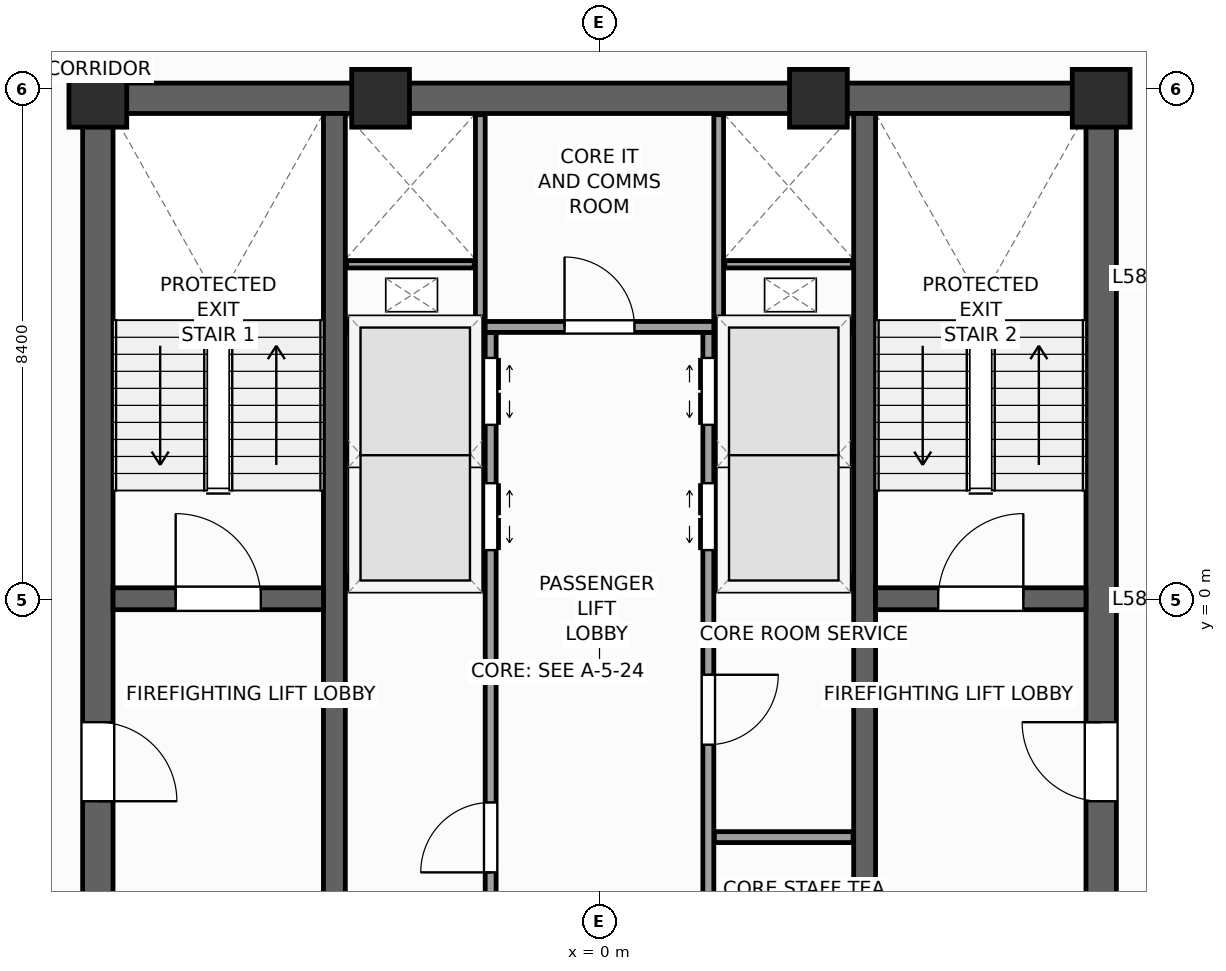
"""IFC4 building model, lengths in metres.
Left out: names, types, materials, properties, quantities, classifications, styles, units other than length and angle.
Written with IfcOpenShell. Run it as: python <this file> out.ifc"""

import sys

from ifc_helpers import new_model, si_unit, direction, frame, frame_2d, origin, origin_2d, place, context, subcontext, project, spatial, rectangle, extrude, source, transform, mapped, element, fill, save


model = new_model("IFC4")
c1 = context("Model", 3, precision=1e-05, world=origin(), true_north=direction((0.0, 1.0)))
c2 = subcontext(c1, "Body", "Model", "MODEL_VIEW")
j1 = project(units=[si_unit("LENGTHUNIT", "METRE"), si_unit("PLANEANGLEUNIT", "RADIAN")], contexts=[c1])
p1 = place(None, origin())
s1 = spatial("IfcSite", under=j1, at=p1, CompositionType="ELEMENT")
p2 = place(p1, origin())
s2 = spatial("IfcBuilding", under=s1, at=p2, CompositionType="ELEMENT")
p3 = place(p2, frame((0.0, 0.0, 240.7)))
s3 = spatial("IfcBuildingStorey", under=s2, at=p3, CompositionType="ELEMENT", Elevation=240.7)
p4 = place(p3, frame((-8.5, 8.25, 0.0), z_axis=(0.0, 0.0, 1.0), x_axis=(1.0, 0.0, 0.0)))
e1 = element("IfcWall", 1, at=p4, inside=s3, PredefinedType="SHEAR", context=c2, shape_type="SweptSolid", body=[
    extrude(rectangle(XDim=17.0, YDim=0.5, at=frame_2d((8.5, 0.0))), origin(), (0.0, 0.0, 1.0), 3.9),
])
p5 = place(p3, frame((-8.25, -8.0, 0.0), z_axis=(0.0, 0.0, 1.0), x_axis=(0.0, 1.0, 0.0)))
e2 = element("IfcWall", 2, at=p5, inside=s3, PredefinedType="SHEAR", context=c2, shape_type="SweptSolid", body=[
    extrude(rectangle(XDim=16.0, YDim=0.5, at=frame_2d((8.0, 0.0))), origin(), (0.0, 0.0, 1.0), 3.9),
])
p6 = place(p5, frame((4.69, 0.0, 0.0)))
e3 = element("IfcOpeningElement", 3, at=p6, cuts=e2, PredefinedType="OPENING", context=c2, shape_type="SweptSolid", body=[
    extrude(rectangle(XDim=1.3, YDim=2.2, at=frame_2d((0.65, 1.1))), frame((0.0, 0.26, 0.0), z_axis=(0.0, -1.0, 0.0), x_axis=(1.0, 0.0, 0.0)), (0.0, 0.0, 1.0), 0.52),
])
p7 = place(p3, frame((8.25, -8.0, 0.0), z_axis=(0.0, 0.0, 1.0), x_axis=(0.0, 1.0, 0.0)))
e4 = element("IfcWall", 4, at=p7, inside=s3, PredefinedType="SHEAR", context=c2, shape_type="SweptSolid", body=[
    extrude(rectangle(XDim=16.0, YDim=0.5, at=frame_2d((8.0, 0.0))), origin(), (0.0, 0.0, 1.0), 3.9),
])
p8 = place(p7, frame((4.69, 0.0, 0.0)))
e5 = element("IfcOpeningElement", 5, at=p8, cuts=e4, PredefinedType="OPENING", context=c2, shape_type="SweptSolid", body=[
    extrude(rectangle(XDim=1.3, YDim=2.2, at=frame_2d((0.65, 1.1))), frame((0.0, 0.26, 0.0), z_axis=(0.0, -1.0, 0.0), x_axis=(1.0, 0.0, 0.0)), (0.0, 0.0, 1.0), 0.52),
])
for number, where, z_axis, x_axis in (
    (6, (-4.36, -8.0, 0.0), (0.0, 0.0, 1.0), (0.0, 1.0, 0.0)),
    (7, (4.36, -8.0, 0.0), (0.0, 0.0, 1.0), (0.0, 1.0, 0.0)),
):
    element("IfcWall", number, at=place(p3, frame(where, z_axis=z_axis, x_axis=x_axis)), inside=s3, PredefinedType="SHEAR", context=c2, shape_type="SweptSolid", body=[
        extrude(rectangle(XDim=16.0, YDim=0.36, at=frame_2d((8.0, 0.0))), origin(), (0.0, 0.0, 1.0), 3.9),
    ])
p9 = place(p3, frame((-8.0, 0.02, 0.0), z_axis=(0.0, 0.0, 1.0), x_axis=(1.0, 0.0, 0.0)))
e8 = element("IfcWall", 8, at=p9, inside=s3, PredefinedType="SHEAR", context=c2, shape_type="SweptSolid", body=[
    extrude(rectangle(XDim=3.46, YDim=0.36, at=frame_2d((1.73, 0.0))), origin(), (0.0, 0.0, 1.0), 3.9),
])
p10 = place(p9, frame((1.03, 0.0, 0.0)))
e9 = element("IfcOpeningElement", 9, at=p10, cuts=e8, PredefinedType="OPENING", context=c2, shape_type="SweptSolid", body=[
    extrude(rectangle(XDim=1.4, YDim=2.2, at=frame_2d((0.7, 1.1))), frame((0.0, 0.19, 0.0), z_axis=(0.0, -1.0, 0.0), x_axis=(1.0, 0.0, 0.0)), (0.0, 0.0, 1.0), 0.38),
])
p11 = place(p3, frame((4.54, 0.02, 0.0), z_axis=(0.0, 0.0, 1.0), x_axis=(1.0, 0.0, 0.0)))
e10 = element("IfcWall", 10, at=p11, inside=s3, PredefinedType="SHEAR", context=c2, shape_type="SweptSolid", body=[
    extrude(rectangle(XDim=3.46, YDim=0.36, at=frame_2d((1.73, 0.0))), origin(), (0.0, 0.0, 1.0), 3.9),
])
p12 = place(p11, frame((1.03, 0.0, 0.0)))
e11 = element("IfcOpeningElement", 11, at=p12, cuts=e10, PredefinedType="OPENING", context=c2, shape_type="SweptSolid", body=[
    extrude(rectangle(XDim=1.4, YDim=2.2, at=frame_2d((0.7, 1.1))), frame((0.0, 0.19, 0.0), z_axis=(0.0, -1.0, 0.0), x_axis=(1.0, 0.0, 0.0)), (0.0, 0.0, 1.0), 0.38),
])
m1 = source(origin(), c2, "Body", "SweptSolid", [
    extrude(rectangle(XDim=0.95, YDim=0.95, at=origin_2d()), origin(), (0.0, 0.0, 1.0), 3.9),
])
for number, where, z_axis, x_axis in (
    (12, (8.25, 8.25, 0.0), (0.0, 0.0, 1.0), (1.0, 0.0, 0.0)),
    (13, (-8.25, 8.25, 0.0), (0.0, 0.0, 1.0), (1.0, 0.0, 0.0)),
    (14, (-3.6, 8.25, 0.0), (0.0, 0.0, 1.0), (1.0, 0.0, 0.0)),
    (15, (3.6, 8.25, 0.0), (0.0, 0.0, 1.0), (1.0, 0.0, 0.0)),
):
    element("IfcColumn", number, at=place(p3, frame(where, z_axis=z_axis, x_axis=x_axis)), inside=s3, PredefinedType="PILASTER", context=c2, shape_type="MappedRepresentation", body=[
        mapped(m1, transform((0.0, 0.0, 0.0), scale=1.0)),
    ])
p13 = place(p3, frame((6.733, -29.154, 0.0), z_axis=(0.0, 0.0, 1.0), x_axis=(0.629325378072, 0.77714192302, 0.0)))
e16 = element("IfcWall", 16, at=p13, inside=s3, PredefinedType="STANDARD", context=c2, shape_type="SweptSolid", body=[
    extrude(rectangle(XDim=36.84, YDim=0.34, at=frame_2d((18.42, 0.0))), origin(), (0.0, 0.0, 1.0), 2.96),
])
p14 = place(p13, frame((3.721, 0.0, 0.48)))
e17 = element("IfcOpeningElement", 17, at=p14, cuts=e16, PredefinedType="OPENING", context=c2, shape_type="SweptSolid", body=[
    extrude(rectangle(XDim=1.4, YDim=2.4, at=frame_2d((0.7, 1.2))), frame((0.0, 0.18, 0.0), z_axis=(0.0, -1.0, 0.0), x_axis=(1.0, 0.0, 0.0)), (0.0, 0.0, 1.0), 0.36),
])
p15 = place(p13, frame((10.559, 0.0, 0.58)))
e18 = element("IfcOpeningElement", 18, at=p15, cuts=e16, PredefinedType="OPENING", context=c2, shape_type="SweptSolid", body=[
    extrude(rectangle(XDim=1.75, YDim=2.3, at=frame_2d((0.875, 1.15))), frame((0.0, 0.18, 0.0), z_axis=(0.0, -1.0, 0.0), x_axis=(1.0, 0.0, 0.0)), (0.0, 0.0, 1.0), 0.36),
])
p16 = place(p13, frame((16.058, 0.0, 0.58)))
e19 = element("IfcOpeningElement", 19, at=p16, cuts=e16, PredefinedType="OPENING", context=c2, shape_type="SweptSolid", body=[
    extrude(rectangle(XDim=1.75, YDim=2.3, at=frame_2d((0.875, 1.15))), frame((0.0, 0.18, 0.0), z_axis=(0.0, -1.0, 0.0), x_axis=(1.0, 0.0, 0.0)), (0.0, 0.0, 1.0), 0.36),
])
p17 = place(p13, frame((24.176, 0.0, 0.58)))
e20 = element("IfcOpeningElement", 20, at=p17, cuts=e16, PredefinedType="OPENING", context=c2, shape_type="SweptSolid", body=[
    extrude(rectangle(XDim=1.75, YDim=2.3, at=frame_2d((0.875, 1.15))), frame((0.0, 0.18, 0.0), z_axis=(0.0, -1.0, 0.0), x_axis=(1.0, 0.0, 0.0)), (0.0, 0.0, 1.0), 0.36),
])
p18 = place(p13, frame((30.982, 0.0, 0.48)))
e21 = element("IfcOpeningElement", 21, at=p18, cuts=e16, PredefinedType="OPENING", context=c2, shape_type="SweptSolid", body=[
    extrude(rectangle(XDim=1.4, YDim=2.4, at=frame_2d((0.7, 1.2))), frame((0.0, 0.18, 0.0), z_axis=(0.0, -1.0, 0.0), x_axis=(1.0, 0.0, 0.0)), (0.0, 0.0, 1.0), 0.36),
])
p19 = place(p3, frame((29.154, 6.733, 0.0), z_axis=(0.0, 0.0, 1.0), x_axis=(-0.77714192302, 0.629325378072, 0.0)))
e22 = element("IfcWall", 22, at=p19, inside=s3, PredefinedType="STANDARD", context=c2, shape_type="SweptSolid", body=[
    extrude(rectangle(XDim=36.84, YDim=0.34, at=frame_2d((18.42, 0.0))), origin(), (0.0, 0.0, 1.0), 2.96),
])
p20 = place(p19, frame((23.495, 0.0, 0.0)))
e23 = element("IfcOpeningElement", 23, at=p20, cuts=e22, PredefinedType="OPENING", context=c2, shape_type="SweptSolid", body=[
    extrude(rectangle(XDim=1.05, YDim=2.25, at=frame_2d((0.525, 1.125))), frame((0.0, 0.18, 0.0), z_axis=(0.0, -1.0, 0.0), x_axis=(1.0, 0.0, 0.0)), (0.0, 0.0, 1.0), 0.36),
])
p21 = place(p19, frame((3.721, 0.0, 0.48)))
e24 = element("IfcOpeningElement", 24, at=p21, cuts=e22, PredefinedType="OPENING", context=c2, shape_type="SweptSolid", body=[
    extrude(rectangle(XDim=1.4, YDim=2.4, at=frame_2d((0.7, 1.2))), frame((0.0, 0.18, 0.0), z_axis=(0.0, -1.0, 0.0), x_axis=(1.0, 0.0, 0.0)), (0.0, 0.0, 1.0), 0.36),
])
p22 = place(p19, frame((9.809, 0.0, 0.58)))
e25 = element("IfcOpeningElement", 25, at=p22, cuts=e22, PredefinedType="OPENING", context=c2, shape_type="SweptSolid", body=[
    extrude(rectangle(XDim=1.75, YDim=2.3, at=frame_2d((0.875, 1.15))), frame((0.0, 0.18, 0.0), z_axis=(0.0, -1.0, 0.0), x_axis=(1.0, 0.0, 0.0)), (0.0, 0.0, 1.0), 0.36),
])
p23 = place(p19, frame((16.058, 0.0, 0.58)))
e26 = element("IfcOpeningElement", 26, at=p23, cuts=e22, PredefinedType="OPENING", context=c2, shape_type="SweptSolid", body=[
    extrude(rectangle(XDim=1.75, YDim=2.3, at=frame_2d((0.875, 1.15))), frame((0.0, 0.18, 0.0), z_axis=(0.0, -1.0, 0.0), x_axis=(1.0, 0.0, 0.0)), (0.0, 0.0, 1.0), 0.36),
])
p24 = place(p19, frame((25.676, 0.0, 0.58)))
e27 = element("IfcOpeningElement", 27, at=p24, cuts=e22, PredefinedType="OPENING", context=c2, shape_type="SweptSolid", body=[
    extrude(rectangle(XDim=1.75, YDim=2.3, at=frame_2d((0.875, 1.15))), frame((0.0, 0.18, 0.0), z_axis=(0.0, -1.0, 0.0), x_axis=(1.0, 0.0, 0.0)), (0.0, 0.0, 1.0), 0.36),
])
p25 = place(p19, frame((32.482, 0.0, 0.48)))
e28 = element("IfcOpeningElement", 28, at=p25, cuts=e22, PredefinedType="OPENING", context=c2, shape_type="SweptSolid", body=[
    extrude(rectangle(XDim=1.4, YDim=2.4, at=frame_2d((0.7, 1.2))), frame((0.0, 0.18, 0.0), z_axis=(0.0, -1.0, 0.0), x_axis=(1.0, 0.0, 0.0)), (0.0, 0.0, 1.0), 0.36),
])
p26 = place(p3, frame((-6.733, 29.154, 0.0), z_axis=(0.0, 0.0, 1.0), x_axis=(-0.629325378072, -0.77714192302, 0.0)))
e29 = element("IfcWall", 29, at=p26, inside=s3, PredefinedType="STANDARD", context=c2, shape_type="SweptSolid", body=[
    extrude(rectangle(XDim=36.84, YDim=0.34, at=frame_2d((18.42, 0.0))), origin(), (0.0, 0.0, 1.0), 2.96),
])
p27 = place(p26, frame((3.721, 0.0, 0.48)))
e30 = element("IfcOpeningElement", 30, at=p27, cuts=e29, PredefinedType="OPENING", context=c2, shape_type="SweptSolid", body=[
    extrude(rectangle(XDim=1.4, YDim=2.4, at=frame_2d((0.7, 1.2))), frame((0.0, 0.18, 0.0), z_axis=(0.0, -1.0, 0.0), x_axis=(1.0, 0.0, 0.0)), (0.0, 0.0, 1.0), 0.36),
])
p28 = place(p26, frame((10.559, 0.0, 0.58)))
e31 = element("IfcOpeningElement", 31, at=p28, cuts=e29, PredefinedType="OPENING", context=c2, shape_type="SweptSolid", body=[
    extrude(rectangle(XDim=1.75, YDim=2.3, at=frame_2d((0.875, 1.15))), frame((0.0, 0.18, 0.0), z_axis=(0.0, -1.0, 0.0), x_axis=(1.0, 0.0, 0.0)), (0.0, 0.0, 1.0), 0.36),
])
p29 = place(p26, frame((16.058, 0.0, 0.58)))
e32 = element("IfcOpeningElement", 32, at=p29, cuts=e29, PredefinedType="OPENING", context=c2, shape_type="SweptSolid", body=[
    extrude(rectangle(XDim=1.75, YDim=2.3, at=frame_2d((0.875, 1.15))), frame((0.0, 0.18, 0.0), z_axis=(0.0, -1.0, 0.0), x_axis=(1.0, 0.0, 0.0)), (0.0, 0.0, 1.0), 0.36),
])
p30 = place(p26, frame((24.176, 0.0, 0.58)))
e33 = element("IfcOpeningElement", 33, at=p30, cuts=e29, PredefinedType="OPENING", context=c2, shape_type="SweptSolid", body=[
    extrude(rectangle(XDim=1.75, YDim=2.3, at=frame_2d((0.875, 1.15))), frame((0.0, 0.18, 0.0), z_axis=(0.0, -1.0, 0.0), x_axis=(1.0, 0.0, 0.0)), (0.0, 0.0, 1.0), 0.36),
])
p31 = place(p26, frame((30.982, 0.0, 0.48)))
e34 = element("IfcOpeningElement", 34, at=p31, cuts=e29, PredefinedType="OPENING", context=c2, shape_type="SweptSolid", body=[
    extrude(rectangle(XDim=1.4, YDim=2.4, at=frame_2d((0.7, 1.2))), frame((0.0, 0.18, 0.0), z_axis=(0.0, -1.0, 0.0), x_axis=(1.0, 0.0, 0.0)), (0.0, 0.0, 1.0), 0.36),
])
p32 = place(p3, frame((-1.79, -7.98, 0.0), z_axis=(0.0, 0.0, 1.0), x_axis=(0.0, 1.0, 0.0)))
e35 = element("IfcWall", 35, at=p32, inside=s3, PredefinedType="PARTITIONING", context=c2, shape_type="SweptSolid", body=[
    extrude(rectangle(XDim=12.38, YDim=0.18, at=frame_2d((6.19, 0.0))), origin(), (0.0, 0.0, 1.0), 3.66),
])
p33 = place(p32, frame((8.8, 0.0, 0.0)))
e36 = element("IfcOpeningElement", 36, at=p33, cuts=e35, PredefinedType="OPENING", context=c2, shape_type="SweptSolid", body=[
    extrude(rectangle(XDim=1.1, YDim=2.2, at=frame_2d((0.55, 1.1))), frame((0.0, 0.1, 0.0), z_axis=(0.0, -1.0, 0.0), x_axis=(1.0, 0.0, 0.0)), (0.0, 0.0, 1.0), 0.2),
])
p34 = place(p32, frame((10.86, 0.0, 0.0)))
e37 = element("IfcOpeningElement", 37, at=p34, cuts=e35, PredefinedType="OPENING", context=c2, shape_type="SweptSolid", body=[
    extrude(rectangle(XDim=1.1, YDim=2.2, at=frame_2d((0.55, 1.1))), frame((0.0, 0.1, 0.0), z_axis=(0.0, -1.0, 0.0), x_axis=(1.0, 0.0, 0.0)), (0.0, 0.0, 1.0), 0.2),
])
p35 = place(p32, frame((3.5, 0.0, 0.0)))
e38 = element("IfcOpeningElement", 38, at=p35, cuts=e35, PredefinedType="OPENING", context=c2, shape_type="SweptSolid", body=[
    extrude(rectangle(XDim=1.15, YDim=2.25, at=frame_2d((0.575, 1.125))), frame((0.0, 0.1, 0.0), z_axis=(0.0, -1.0, 0.0), x_axis=(1.0, 0.0, 0.0)), (0.0, 0.0, 1.0), 0.2),
])
p36 = place(p3, frame((1.79, -7.98, 0.0), z_axis=(0.0, 0.0, 1.0), x_axis=(0.0, 1.0, 0.0)))
e39 = element("IfcWall", 39, at=p36, inside=s3, PredefinedType="PARTITIONING", context=c2, shape_type="SweptSolid", body=[
    extrude(rectangle(XDim=12.38, YDim=0.18, at=frame_2d((6.19, 0.0))), origin(), (0.0, 0.0, 1.0), 3.66),
])
p37 = place(p36, frame((8.8, 0.0, 0.0)))
e40 = element("IfcOpeningElement", 40, at=p37, cuts=e39, PredefinedType="OPENING", context=c2, shape_type="SweptSolid", body=[
    extrude(rectangle(XDim=1.1, YDim=2.2, at=frame_2d((0.55, 1.1))), frame((0.0, 0.1, 0.0), z_axis=(0.0, -1.0, 0.0), x_axis=(1.0, 0.0, 0.0)), (0.0, 0.0, 1.0), 0.2),
])
p38 = place(p36, frame((10.86, 0.0, 0.0)))
e41 = element("IfcOpeningElement", 41, at=p38, cuts=e39, PredefinedType="OPENING", context=c2, shape_type="SweptSolid", body=[
    extrude(rectangle(XDim=1.1, YDim=2.2, at=frame_2d((0.55, 1.1))), frame((0.0, 0.1, 0.0), z_axis=(0.0, -1.0, 0.0), x_axis=(1.0, 0.0, 0.0)), (0.0, 0.0, 1.0), 0.2),
])
p39 = place(p36, frame((1.4, 0.0, 0.0)))
e42 = element("IfcOpeningElement", 42, at=p39, cuts=e39, PredefinedType="OPENING", context=c2, shape_type="SweptSolid", body=[
    extrude(rectangle(XDim=1.15, YDim=2.25, at=frame_2d((0.575, 1.125))), frame((0.0, 0.1, 0.0), z_axis=(0.0, -1.0, 0.0), x_axis=(1.0, 0.0, 0.0)), (0.0, 0.0, 1.0), 0.2),
])
p40 = place(p36, frame((5.6, 0.0, 0.0)))
e43 = element("IfcOpeningElement", 43, at=p40, cuts=e39, PredefinedType="OPENING", context=c2, shape_type="SweptSolid", body=[
    extrude(rectangle(XDim=1.15, YDim=2.25, at=frame_2d((0.575, 1.125))), frame((0.0, 0.1, 0.0), z_axis=(0.0, -1.0, 0.0), x_axis=(1.0, 0.0, 0.0)), (0.0, 0.0, 1.0), 0.2),
])
p41 = place(p3, frame((-1.88, 4.49, 0.0), z_axis=(0.0, 0.0, 1.0), x_axis=(1.0, 0.0, 0.0)))
e44 = element("IfcWall", 44, at=p41, inside=s3, PredefinedType="PARTITIONING", context=c2, shape_type="SweptSolid", body=[
    extrude(rectangle(XDim=3.76, YDim=0.18, at=frame_2d((1.88, 0.0))), origin(), (0.0, 0.0, 1.0), 3.66),
])
p42 = place(p41, frame((1.305, 0.0, 0.0)))
e45 = element("IfcOpeningElement", 45, at=p42, cuts=e44, PredefinedType="OPENING", context=c2, shape_type="SweptSolid", body=[
    extrude(rectangle(XDim=1.15, YDim=2.25, at=frame_2d((0.575, 1.125))), frame((0.0, 0.1, 0.0), z_axis=(0.0, -1.0, 0.0), x_axis=(1.0, 0.0, 0.0)), (0.0, 0.0, 1.0), 0.2),
])
for number, where, z_axis, x_axis in (
    (46, (1.89, -3.9, 0.0), (0.0, 0.0, 1.0), (1.0, 0.0, 0.0)),
    (47, (-4.17, 0.3, 0.0), (0.0, 0.0, 1.0), (1.0, 0.0, 0.0)),
    (48, (1.89, 0.3, 0.0), (0.0, 0.0, 1.0), (1.0, 0.0, 0.0)),
    (49, (-4.17, 4.49, 0.0), (0.0, 0.0, 1.0), (1.0, 0.0, 0.0)),
    (50, (1.89, 4.49, 0.0), (0.0, 0.0, 1.0), (1.0, 0.0, 0.0)),
):
    element("IfcWall", number, at=place(p3, frame(where, z_axis=z_axis, x_axis=x_axis)), inside=s3, PredefinedType="PARTITIONING", context=c2, shape_type="SweptSolid", body=[
        extrude(rectangle(XDim=2.28, YDim=0.18, at=frame_2d((1.14, 0.0))), origin(), (0.0, 0.0, 1.0), 3.66),
    ])
for number, where, z_axis, x_axis in (
    (51, (-4.16, 2.4, 0.0), (0.0, 0.0, 1.0), (1.0, 0.0, 0.0)),
    (52, (1.9, 2.4, 0.0), (0.0, 0.0, 1.0), (1.0, 0.0, 0.0)),
):
    element("IfcWall", number, at=place(p3, frame(where, z_axis=z_axis, x_axis=x_axis)), inside=s3, PredefinedType="PARTITIONING", context=c2, shape_type="SweptSolid", body=[
        extrude(rectangle(XDim=2.26, YDim=0.12, at=frame_2d((1.13, 0.0))), origin(), (0.0, 0.0, 1.0), 3.66),
    ])
for number, where, z_axis, x_axis in (
    (53, (-1.96, 4.58, 0.0), (0.0, 0.0, 1.0), (0.0, 1.0, 0.0)),
    (54, (1.96, 4.58, 0.0), (0.0, 0.0, 1.0), (0.0, 1.0, 0.0)),
):
    element("IfcWall", number, at=place(p3, frame(where, z_axis=z_axis, x_axis=x_axis)), inside=s3, PredefinedType="PARTITIONING", context=c2, shape_type="SweptSolid", body=[
        extrude(rectangle(XDim=3.4, YDim=0.16, at=frame_2d((1.7, 0.0))), origin(), (0.0, 0.0, 1.0), 3.66),
    ])
for number, where, z_axis, x_axis in (
    (55, (-4.16, 5.52, 0.0), (0.0, 0.0, 1.0), (1.0, 0.0, 0.0)),
    (56, (2.06, 5.52, 0.0), (0.0, 0.0, 1.0), (1.0, 0.0, 0.0)),
):
    element("IfcWall", number, at=place(p3, frame(where, z_axis=z_axis, x_axis=x_axis)), inside=s3, PredefinedType="PARTITIONING", context=c2, shape_type="SweptSolid", body=[
        extrude(rectangle(XDim=2.1, YDim=0.12, at=frame_2d((1.05, 0.0))), origin(), (0.0, 0.0, 1.0), 3.66),
    ])
m2 = source(origin(), c2, "Body", "SweptSolid", [
    extrude(rectangle(XDim=1.4, YDim=2.2, at=frame_2d((0.7, 1.1))), frame((0.0, 0.025, 0.0), z_axis=(0.0, -1.0, 0.0), x_axis=(1.0, 0.0, 0.0)), (0.0, 0.0, 1.0), 0.05),
])
p43 = place(p10, origin())
e57 = element("IfcDoor", 57, at=p43, inside=s3, OperationType="SINGLE_SWING_LEFT", PredefinedType="DOOR", context=c2, shape_type="MappedRepresentation", body=[
    mapped(m2, transform((0.0, 0.0, 0.0), scale=1.0)),
])
fill(e9, e57)
p44 = place(p12, origin())
e58 = element("IfcDoor", 58, at=p44, inside=s3, OperationType="SINGLE_SWING_RIGHT", PredefinedType="DOOR", context=c2, shape_type="MappedRepresentation", body=[
    mapped(m2, transform((0.0, 0.0, 0.0), scale=1.0)),
])
fill(e11, e58)
m3 = source(origin(), c2, "Body", "SweptSolid", [
    extrude(rectangle(XDim=1.3, YDim=2.2, at=frame_2d((0.65, 1.1))), frame((0.0, 0.025, 0.0), z_axis=(0.0, -1.0, 0.0), x_axis=(1.0, 0.0, 0.0)), (0.0, 0.0, 1.0), 0.05),
])
p45 = place(p6, frame((1.3, 0.0, 0.0), z_axis=(0.0, 0.0, 1.0), x_axis=(-1.0, 0.0, 0.0)))
e59 = element("IfcDoor", 59, at=p45, inside=s3, OperationType="SINGLE_SWING_LEFT", PredefinedType="DOOR", context=c2, shape_type="MappedRepresentation", body=[
    mapped(m3, transform((0.0, 0.0, 0.0), scale=1.0)),
])
fill(e3, e59)
p46 = place(p8, origin())
e60 = element("IfcDoor", 60, at=p46, inside=s3, OperationType="SINGLE_SWING_RIGHT", PredefinedType="DOOR", context=c2, shape_type="MappedRepresentation", body=[
    mapped(m3, transform((0.0, 0.0, 0.0), scale=1.0)),
])
fill(e5, e60)
m4 = source(origin(), c2, "Body", "SweptSolid", [
    extrude(rectangle(XDim=1.1, YDim=2.2, at=frame_2d((0.55, 1.1))), frame((0.0, 0.025, 0.0), z_axis=(0.0, -1.0, 0.0), x_axis=(1.0, 0.0, 0.0)), (0.0, 0.0, 1.0), 0.05),
])
p47 = place(p33, frame((1.1, 0.0, 0.0), z_axis=(0.0, 0.0, 1.0), x_axis=(-1.0, 0.0, 0.0)))
e61 = element("IfcDoor", 61, at=p47, inside=s3, OperationType="DOUBLE_DOOR_SLIDING", PredefinedType="DOOR", context=c2, shape_type="MappedRepresentation", body=[
    mapped(m4, transform((0.0, 0.0, 0.0), scale=1.0)),
])
fill(e36, e61)
p48 = place(p34, frame((1.1, 0.0, 0.0), z_axis=(0.0, 0.0, 1.0), x_axis=(-1.0, 0.0, 0.0)))
e62 = element("IfcDoor", 62, at=p48, inside=s3, OperationType="DOUBLE_DOOR_SLIDING", PredefinedType="DOOR", context=c2, shape_type="MappedRepresentation", body=[
    mapped(m4, transform((0.0, 0.0, 0.0), scale=1.0)),
])
fill(e37, e62)
p49 = place(p37, origin())
e63 = element("IfcDoor", 63, at=p49, inside=s3, OperationType="DOUBLE_DOOR_SLIDING", PredefinedType="DOOR", context=c2, shape_type="MappedRepresentation", body=[
    mapped(m4, transform((0.0, 0.0, 0.0), scale=1.0)),
])
fill(e40, e63)
p50 = place(p38, origin())
e64 = element("IfcDoor", 64, at=p50, inside=s3, OperationType="DOUBLE_DOOR_SLIDING", PredefinedType="DOOR", context=c2, shape_type="MappedRepresentation", body=[
    mapped(m4, transform((0.0, 0.0, 0.0), scale=1.0)),
])
fill(e41, e64)
m5 = source(origin(), c2, "Body", "SweptSolid", [
    extrude(rectangle(XDim=1.15, YDim=2.25, at=frame_2d((0.575, 1.125))), frame((0.0, 0.025, 0.0), z_axis=(0.0, -1.0, 0.0), x_axis=(1.0, 0.0, 0.0)), (0.0, 0.0, 1.0), 0.05),
])
p51 = place(p35, origin())
e65 = element("IfcDoor", 65, at=p51, inside=s3, OperationType="SINGLE_SWING_LEFT", PredefinedType="DOOR", context=c2, shape_type="MappedRepresentation", body=[
    mapped(m5, transform((0.0, 0.0, 0.0), scale=1.0)),
])
fill(e38, e65)
p52 = place(p40, frame((1.15, 0.0, 0.0), z_axis=(0.0, 0.0, 1.0), x_axis=(-1.0, 0.0, 0.0)))
e66 = element("IfcDoor", 66, at=p52, inside=s3, OperationType="SINGLE_SWING_RIGHT", PredefinedType="DOOR", context=c2, shape_type="MappedRepresentation", body=[
    mapped(m5, transform((0.0, 0.0, 0.0), scale=1.0)),
])
fill(e43, e66)
p53 = place(p42, origin())
e67 = element("IfcDoor", 67, at=p53, inside=s3, OperationType="SINGLE_SWING_LEFT", PredefinedType="DOOR", context=c2, shape_type="MappedRepresentation", body=[
    mapped(m5, transform((0.0, 0.0, 0.0), scale=1.0)),
])
fill(e45, e67)
save(model, sys.argv[1])
